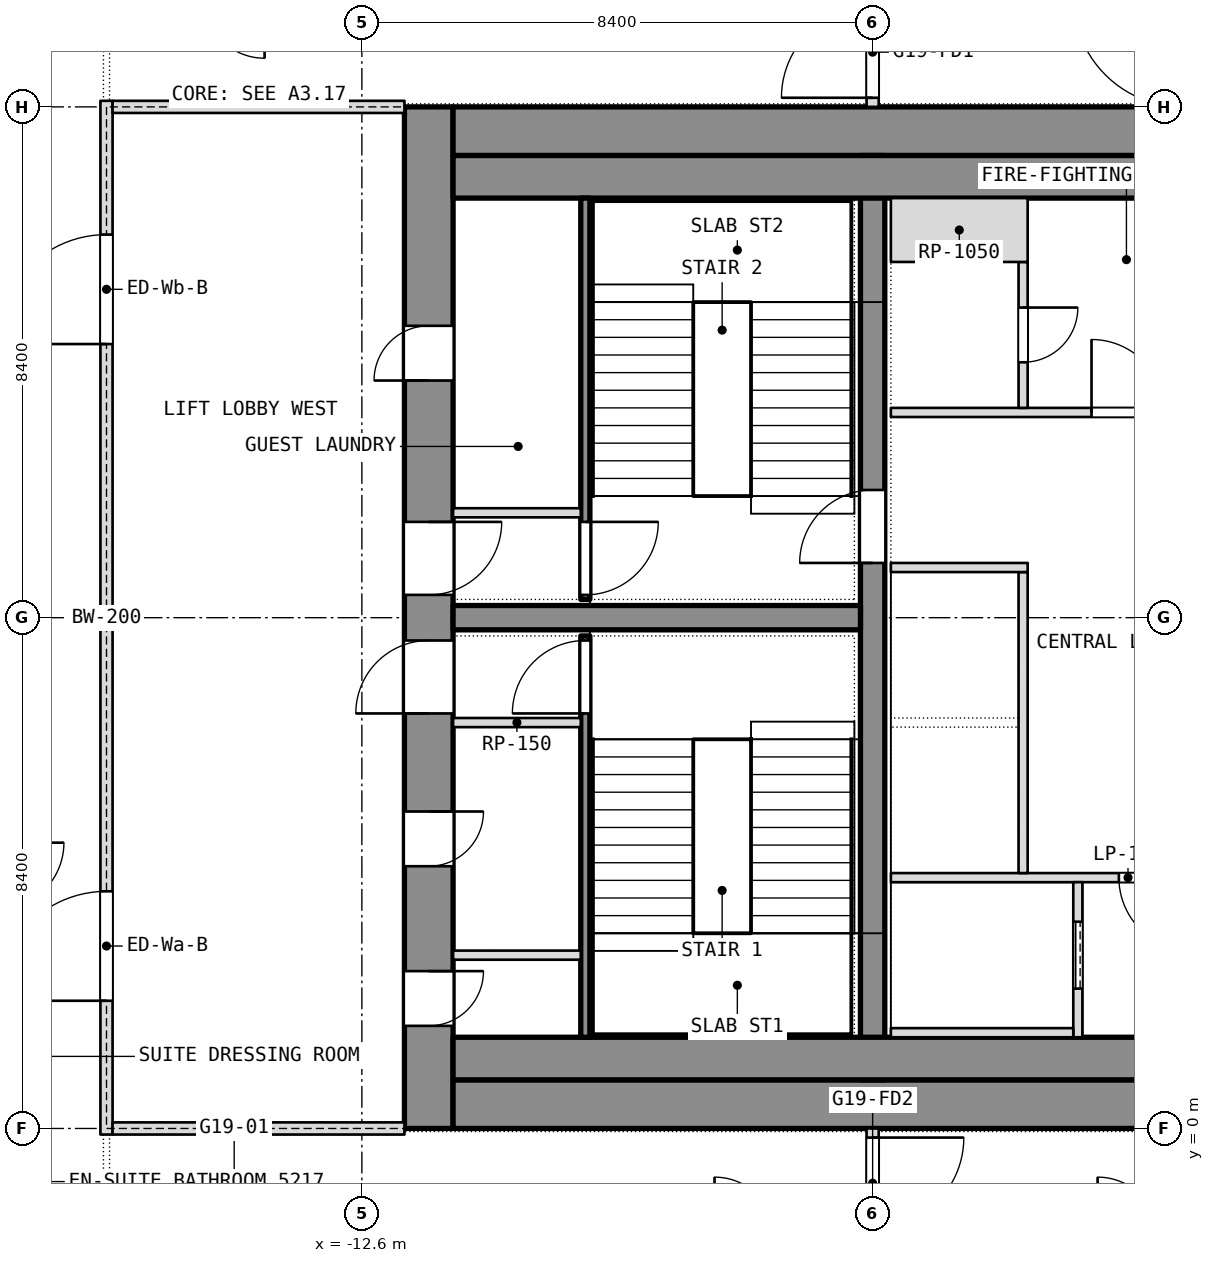
"""IFC4 building model, lengths in metres.
Left out: names, types, materials, properties, quantities, classifications, styles, units other than length and angle.
Written with IfcOpenShell. Run it as: python <this file> out.ifc"""

import sys

from ifc_helpers import new_model, si_unit, direction, frame, frame_2d, origin, place, context, subcontext, project, spatial, rectangle, extrude, element, fill, save


model = new_model("IFC4")
c1 = context("Model", 3, precision=1e-05, world=origin(), true_north=direction((0.0, 1.0)))
c2 = subcontext(c1, "Body", "Model", "MODEL_VIEW")
j1 = project(units=[si_unit("LENGTHUNIT", "METRE"), si_unit("PLANEANGLEUNIT", "RADIAN")], contexts=[c1])
p1 = place(None, origin())
s1 = spatial("IfcSite", under=j1, at=p1, CompositionType="ELEMENT")
p2 = place(p1, origin())
s2 = spatial("IfcBuilding", under=s1, at=p2, CompositionType="ELEMENT")
p3 = place(p2, frame((0.0, 0.0, 223.7)))
s3 = spatial("IfcBuildingStorey", under=s2, at=p3, CompositionType="ELEMENT", Elevation=223.7)
p4 = place(p3, frame((-11.5, 0.0, 0.0), z_axis=(0.0, 0.0, 1.0), x_axis=(0.0, 1.0, 0.0)))
e1 = element("IfcWall", 1, at=p4, inside=s3, PredefinedType="SHEAR", context=c2, shape_type="SweptSolid", body=[
    extrude(rectangle(XDim=16.8, YDim=0.8, at=frame_2d((8.4, 0.0))), origin(), (0.0, 0.0, 1.0), 3.6),
])
p5 = place(p4, frame((1.688, 0.0, 0.0)))
e2 = element("IfcOpeningElement", 2, at=p5, cuts=e1, PredefinedType="OPENING", context=c2, shape_type="SweptSolid", body=[
    extrude(rectangle(XDim=0.9, YDim=2.1, at=frame_2d((0.45, 1.05))), frame((0.0, 0.4, 0.0), z_axis=(0.0, -1.0, 0.0), x_axis=(1.0, 0.0, 0.0)), (0.0, 0.0, 1.0), 0.8),
])
p6 = place(p4, frame((4.312, 0.0, 0.0)))
e3 = element("IfcOpeningElement", 3, at=p6, cuts=e1, PredefinedType="OPENING", context=c2, shape_type="SweptSolid", body=[
    extrude(rectangle(XDim=0.9, YDim=2.1, at=frame_2d((0.45, 1.05))), frame((0.0, 0.4, 0.0), z_axis=(0.0, -1.0, 0.0), x_axis=(1.0, 0.0, 0.0)), (0.0, 0.0, 1.0), 0.8),
])
p7 = place(p4, frame((6.825, 0.0, 0.0)))
e4 = element("IfcOpeningElement", 4, at=p7, cuts=e1, PredefinedType="OPENING", context=c2, shape_type="SweptSolid", body=[
    extrude(rectangle(XDim=1.2, YDim=2.1, at=frame_2d((0.6, 1.05))), frame((0.0, 0.4, 0.0), z_axis=(0.0, -1.0, 0.0), x_axis=(1.0, 0.0, 0.0)), (0.0, 0.0, 1.0), 0.8),
])
p8 = place(p4, frame((12.3, 0.0, 0.0)))
e5 = element("IfcOpeningElement", 5, at=p8, cuts=e1, PredefinedType="OPENING", context=c2, shape_type="SweptSolid", body=[
    extrude(rectangle(XDim=0.9, YDim=2.1, at=frame_2d((0.45, 1.05))), frame((0.0, 0.4, 0.0), z_axis=(0.0, -1.0, 0.0), x_axis=(1.0, 0.0, 0.0)), (0.0, 0.0, 1.0), 0.8),
])
p9 = place(p4, frame((8.775, 0.0, 0.0)))
e6 = element("IfcOpeningElement", 6, at=p9, cuts=e1, PredefinedType="OPENING", context=c2, shape_type="SweptSolid", body=[
    extrude(rectangle(XDim=1.2, YDim=2.1, at=frame_2d((0.6, 1.05))), frame((0.0, 0.4, 0.0), z_axis=(0.0, -1.0, 0.0), x_axis=(1.0, 0.0, 0.0)), (0.0, 0.0, 1.0), 0.8),
])
for number, where, z_axis, x_axis in (
    (7, (-11.1, 0.4, 0.0), (0.0, 0.0, 1.0), (1.0, 0.0, 0.0)),
    (8, (-11.1, 16.4, 0.0), (0.0, 0.0, 1.0), (1.0, 0.0, 0.0)),
):
    element("IfcWall", number, at=place(p3, frame(where, z_axis=z_axis, x_axis=x_axis)), inside=s3, PredefinedType="SHEAR", context=c2, shape_type="SweptSolid", body=[
        extrude(rectangle(XDim=22.2, YDim=0.8, at=frame_2d((11.1, 0.0))), origin(), (0.0, 0.0, 1.0), 3.6),
    ])
p10 = place(p3, frame((-4.2, 0.8, 0.0), z_axis=(0.0, 0.0, 1.0), x_axis=(0.0, 1.0, 0.0)))
e9 = element("IfcWall", 9, at=p10, inside=s3, PredefinedType="SHEAR", context=c2, shape_type="SweptSolid", body=[
    extrude(rectangle(XDim=15.2, YDim=0.4, at=frame_2d((7.6, 0.0))), origin(), (0.0, 0.0, 1.0), 3.6),
])
p11 = place(p10, frame((8.5, 0.0, 0.0)))
e10 = element("IfcOpeningElement", 10, at=p11, cuts=e9, PredefinedType="OPENING", context=c2, shape_type="SweptSolid", body=[
    extrude(rectangle(XDim=1.2, YDim=2.1, at=frame_2d((0.6, 1.05))), frame((0.0, 0.2, 0.0), z_axis=(0.0, -1.0, 0.0), x_axis=(1.0, 0.0, 0.0)), (0.0, 0.0, 1.0), 0.4),
])
p12 = place(p3, frame((-11.1, 8.4, 0.0), z_axis=(0.0, 0.0, 1.0), x_axis=(1.0, 0.0, 0.0)))
e11 = element("IfcWall", 11, at=p12, inside=s3, PredefinedType="SHEAR", context=c2, shape_type="SweptSolid", body=[
    extrude(rectangle(XDim=6.7, YDim=0.4, at=frame_2d((3.35, 0.0))), origin(), (0.0, 0.0, 1.0), 3.6),
])
p13 = place(p3, frame((-4.2, -13.6, 0.0), z_axis=(0.0, 0.0, 1.0), x_axis=(0.0, 1.0, 0.0)))
e12 = element("IfcWall", 12, at=p13, inside=s3, PredefinedType="PARTITIONING", context=c2, shape_type="SweptSolid", body=[
    extrude(rectangle(XDim=13.6, YDim=0.2, at=frame_2d((6.8, 0.0))), origin(), (0.0, 0.0, 1.0), 3.34),
])
p14 = place(p13, frame((11.95, 0.0, 0.0)))
e13 = element("IfcOpeningElement", 13, at=p14, cuts=e12, PredefinedType="OPENING", context=c2, shape_type="SweptSolid", body=[
    extrude(rectangle(XDim=1.5, YDim=2.1, at=frame_2d((0.75, 1.05))), frame((0.0, 0.1, 0.0), z_axis=(0.0, -1.0, 0.0), x_axis=(1.0, 0.0, 0.0)), (0.0, 0.0, 1.0), 0.2),
])
p15 = place(p13, frame((0.25, 0.0, 0.0)))
e14 = element("IfcOpeningElement", 14, at=p15, cuts=e12, PredefinedType="OPENING", context=c2, shape_type="SweptSolid", body=[
    extrude(rectangle(XDim=1.5, YDim=2.1, at=frame_2d((0.75, 1.05))), frame((0.0, 0.1, 0.0), z_axis=(0.0, -1.0, 0.0), x_axis=(1.0, 0.0, 0.0)), (0.0, 0.0, 1.0), 0.2),
])
p16 = place(p3, frame((-4.2, 16.8, 0.0), z_axis=(0.0, 0.0, 1.0), x_axis=(0.0, 1.0, 0.0)))
e15 = element("IfcWall", 15, at=p16, inside=s3, PredefinedType="PARTITIONING", context=c2, shape_type="SweptSolid", body=[
    extrude(rectangle(XDim=5.54, YDim=0.2, at=frame_2d((2.77, 0.0))), origin(), (0.0, 0.0, 1.0), 3.34),
])
p17 = place(p16, frame((0.15, 0.0, 0.0)))
e16 = element("IfcOpeningElement", 16, at=p17, cuts=e15, PredefinedType="OPENING", context=c2, shape_type="SweptSolid", body=[
    extrude(rectangle(XDim=1.5, YDim=2.1, at=frame_2d((0.75, 1.05))), frame((0.0, 0.1, 0.0), z_axis=(0.0, -1.0, 0.0), x_axis=(1.0, 0.0, 0.0)), (0.0, 0.0, 1.0), 0.2),
])
for number, where, z_axis, x_axis in (
    (17, (-11.1, 1.15, 0.0), (0.0, 0.0, 1.0), (1.0, 0.0, 0.0)),
    (18, (-11.1, 15.65, 0.0), (0.0, 0.0, 1.0), (1.0, 0.0, 0.0)),
):
    element("IfcWall", number, at=place(p3, frame(where, z_axis=z_axis, x_axis=x_axis)), inside=s3, PredefinedType="PARTITIONING", context=c2, shape_type="SweptSolid", body=[
        extrude(rectangle(XDim=22.2, YDim=0.7, at=frame_2d((11.1, 0.0))), origin(), (0.0, 0.0, 1.0), 3.34),
    ])
p18 = place(p3, frame((-8.925, 1.5, 0.0), z_axis=(0.0, 0.0, 1.0), x_axis=(0.0, 1.0, 0.0)))
e19 = element("IfcWall", 19, at=p18, inside=s3, PredefinedType="SHEAR", context=c2, shape_type="SweptSolid", body=[
    extrude(rectangle(XDim=6.6, YDim=0.15, at=frame_2d((3.3, 0.0))), origin(), (0.0, 0.0, 1.0), 3.34),
])
p19 = place(p18, frame((5.325, 0.0, 0.0)))
e20 = element("IfcOpeningElement", 20, at=p19, cuts=e19, PredefinedType="OPENING", context=c2, shape_type="SweptSolid", body=[
    extrude(rectangle(XDim=1.2, YDim=2.1, at=frame_2d((0.6, 1.05))), frame((0.0, 0.075, 0.0), z_axis=(0.0, -1.0, 0.0), x_axis=(1.0, 0.0, 0.0)), (0.0, 0.0, 1.0), 0.15),
])
for number, where, z_axis, x_axis in (
    (21, (-11.1, 6.675, 0.0), (0.0, 0.0, 1.0), (1.0, 0.0, 0.0)),
    (22, (-11.1, 2.85, 0.0), (0.0, 0.0, 1.0), (1.0, 0.0, 0.0)),
):
    element("IfcWall", number, at=place(p3, frame(where, z_axis=z_axis, x_axis=x_axis)), inside=s3, PredefinedType="PARTITIONING", context=c2, shape_type="SweptSolid", body=[
        extrude(rectangle(XDim=2.1, YDim=0.15, at=frame_2d((1.05, 0.0))), origin(), (0.0, 0.0, 1.0), 3.34),
    ])
p20 = place(p3, frame((-8.925, 8.7, 0.0), z_axis=(0.0, 0.0, 1.0), x_axis=(0.0, 1.0, 0.0)))
e23 = element("IfcWall", 23, at=p20, inside=s3, PredefinedType="SHEAR", context=c2, shape_type="SweptSolid", body=[
    extrude(rectangle(XDim=6.6, YDim=0.15, at=frame_2d((3.3, 0.0))), origin(), (0.0, 0.0, 1.0), 3.34),
])
p21 = place(p20, frame((0.075, 0.0, 0.0)))
e24 = element("IfcOpeningElement", 24, at=p21, cuts=e23, PredefinedType="OPENING", context=c2, shape_type="SweptSolid", body=[
    extrude(rectangle(XDim=1.2, YDim=2.1, at=frame_2d((0.6, 1.05))), frame((0.0, 0.075, 0.0), z_axis=(0.0, -1.0, 0.0), x_axis=(1.0, 0.0, 0.0)), (0.0, 0.0, 1.0), 0.15),
])
p22 = place(p3, frame((-11.1, 10.125, 0.0), z_axis=(0.0, 0.0, 1.0), x_axis=(1.0, 0.0, 0.0)))
e25 = element("IfcWall", 25, at=p22, inside=s3, PredefinedType="PARTITIONING", context=c2, shape_type="SweptSolid", body=[
    extrude(rectangle(XDim=2.1, YDim=0.15, at=frame_2d((1.05, 0.0))), origin(), (0.0, 0.0, 1.0), 3.34),
])
p23 = place(p3, frame((-3.9, 4.125, 0.0), z_axis=(0.0, 0.0, 1.0), x_axis=(1.0, 0.0, 0.0)))
e26 = element("IfcWall", 26, at=p23, inside=s3, PredefinedType="PARTITIONING", context=c2, shape_type="SweptSolid", body=[
    extrude(rectangle(XDim=7.8, YDim=0.15, at=frame_2d((3.9, 0.0))), origin(), (0.0, 0.0, 1.0), 3.34),
])
p24 = place(p23, frame((3.75, 0.0, 0.0)))
e27 = element("IfcOpeningElement", 27, at=p24, cuts=e26, PredefinedType="OPENING", context=c2, shape_type="SweptSolid", body=[
    extrude(rectangle(XDim=1.2, YDim=2.1, at=frame_2d((0.6, 1.05))), frame((0.0, 0.075, 0.0), z_axis=(0.0, -1.0, 0.0), x_axis=(1.0, 0.0, 0.0)), (0.0, 0.0, 1.0), 0.15),
])
p25 = place(p3, frame((-3.9, 11.775, 0.0), z_axis=(0.0, 0.0, 1.0), x_axis=(1.0, 0.0, 0.0)))
e28 = element("IfcWall", 28, at=p25, inside=s3, PredefinedType="PARTITIONING", context=c2, shape_type="SweptSolid", body=[
    extrude(rectangle(XDim=7.8, YDim=0.15, at=frame_2d((3.9, 0.0))), origin(), (0.0, 0.0, 1.0), 3.34),
])
p26 = place(p25, frame((3.3, 0.0, 0.0)))
e29 = element("IfcOpeningElement", 29, at=p26, cuts=e28, PredefinedType="OPENING", context=c2, shape_type="SweptSolid", body=[
    extrude(rectangle(XDim=1.2, YDim=2.1, at=frame_2d((0.6, 1.05))), frame((0.0, 0.075, 0.0), z_axis=(0.0, -1.0, 0.0), x_axis=(1.0, 0.0, 0.0)), (0.0, 0.0, 1.0), 0.15),
])
p27 = place(p3, frame((-0.825, 1.5, 0.0), z_axis=(0.0, 0.0, 1.0), x_axis=(0.0, 1.0, 0.0)))
e30 = element("IfcWall", 30, at=p27, inside=s3, PredefinedType="SHEAR", context=c2, shape_type="SweptSolid", body=[
    extrude(rectangle(XDim=2.55, YDim=0.15, at=frame_2d((1.275, 0.0))), origin(), (0.0, 0.0, 1.0), 3.6),
])
p28 = place(p27, frame((0.8, 0.0, 0.0)))
e31 = element("IfcOpeningElement", 31, at=p28, cuts=e30, PredefinedType="OPENING", context=c2, shape_type="SweptSolid", body=[
    extrude(rectangle(XDim=1.1, YDim=2.1, at=frame_2d((0.55, 1.05))), frame((0.0, 0.075, 0.0), z_axis=(0.0, -1.0, 0.0), x_axis=(1.0, 0.0, 0.0)), (0.0, 0.0, 1.0), 0.15),
])
p29 = place(p3, frame((-3.9, 1.575, 0.0), z_axis=(0.0, 0.0, 1.0), x_axis=(1.0, 0.0, 0.0)))
e32 = element("IfcWall", 32, at=p29, inside=s3, PredefinedType="SHEAR", context=c2, shape_type="SweptSolid", body=[
    extrude(rectangle(XDim=3.0, YDim=0.15, at=frame_2d((1.5, 0.0))), origin(), (0.0, 0.0, 1.0), 3.6),
])
p30 = place(p3, frame((-1.725, 4.2, 0.0), z_axis=(0.0, 0.0, 1.0), x_axis=(0.0, 1.0, 0.0)))
e33 = element("IfcWall", 33, at=p30, inside=s3, PredefinedType="SHEAR", context=c2, shape_type="SweptSolid", body=[
    extrude(rectangle(XDim=4.95, YDim=0.15, at=frame_2d((2.475, 0.0))), origin(), (0.0, 0.0, 1.0), 3.6),
])
p31 = place(p3, frame((-3.9, 9.225, 0.0), z_axis=(0.0, 0.0, 1.0), x_axis=(1.0, 0.0, 0.0)))
e34 = element("IfcWall", 34, at=p31, inside=s3, PredefinedType="SHEAR", context=c2, shape_type="SweptSolid", body=[
    extrude(rectangle(XDim=2.25, YDim=0.15, at=frame_2d((1.125, 0.0))), origin(), (0.0, 0.0, 1.0), 3.6),
])
p32 = place(p3, frame((-1.725, 11.85, 0.0), z_axis=(0.0, 0.0, 1.0), x_axis=(0.0, 1.0, 0.0)))
e35 = element("IfcWall", 35, at=p32, inside=s3, PredefinedType="PARTITIONING", context=c2, shape_type="SweptSolid", body=[
    extrude(rectangle(XDim=2.4, YDim=0.15, at=frame_2d((1.2, 0.0))), origin(), (0.0, 0.0, 1.0), 3.34),
])
p33 = place(p32, frame((0.75, 0.0, 0.0)))
e36 = element("IfcOpeningElement", 36, at=p33, cuts=e35, PredefinedType="OPENING", context=c2, shape_type="SweptSolid", body=[
    extrude(rectangle(XDim=0.9, YDim=2.1, at=frame_2d((0.45, 1.05))), frame((0.0, 0.075, 0.0), z_axis=(0.0, -1.0, 0.0), x_axis=(1.0, 0.0, 0.0)), (0.0, 0.0, 1.0), 0.15),
])
p34 = place(p3, frame((-3.9, 14.775, 0.0), z_axis=(0.0, 0.0, 1.0), x_axis=(1.0, 0.0, 0.0)))
e37 = element("IfcWall", 37, at=p34, inside=s3, PredefinedType="PARTITIONING", context=c2, shape_type="SweptSolid", body=[
    extrude(rectangle(XDim=2.25, YDim=1.05, at=frame_2d((1.125, 0.0))), origin(), (0.0, 0.0, 1.0), 3.34),
])
p35 = place(p3, frame((-16.8, -0.1, 0.0), z_axis=(0.0, 0.0, 1.0), x_axis=(0.0, 1.0, 0.0)))
e38 = element("IfcWall", 38, at=p35, inside=s3, PredefinedType="PARTITIONING", context=c2, shape_type="SweptSolid", body=[
    extrude(rectangle(XDim=17.0, YDim=0.2, at=frame_2d((8.5, 0.0))), origin(), (0.0, 0.0, 1.0), 3.34),
])
p36 = place(p35, frame((2.2, 0.0, 0.0)))
e39 = element("IfcOpeningElement", 39, at=p36, cuts=e38, PredefinedType="OPENING", context=c2, shape_type="SweptSolid", body=[
    extrude(rectangle(XDim=1.8, YDim=2.1, at=frame_2d((0.9, 1.05))), frame((0.0, 0.1, 0.0), z_axis=(0.0, -1.0, 0.0), x_axis=(1.0, 0.0, 0.0)), (0.0, 0.0, 1.0), 0.2),
])
p37 = place(p35, frame((13.0, 0.0, 0.0)))
e40 = element("IfcOpeningElement", 40, at=p37, cuts=e38, PredefinedType="OPENING", context=c2, shape_type="SweptSolid", body=[
    extrude(rectangle(XDim=1.8, YDim=2.1, at=frame_2d((0.9, 1.05))), frame((0.0, 0.1, 0.0), z_axis=(0.0, -1.0, 0.0), x_axis=(1.0, 0.0, 0.0)), (0.0, 0.0, 1.0), 0.2),
])
for number, where, z_axis, x_axis in (
    (41, (-16.7, 0.0, 0.0), (0.0, 0.0, 1.0), (1.0, 0.0, 0.0)),
    (42, (-16.7, 16.8, 0.0), (0.0, 0.0, 1.0), (1.0, 0.0, 0.0)),
):
    element("IfcWall", number, at=place(p3, frame(where, z_axis=z_axis, x_axis=x_axis)), inside=s3, PredefinedType="PARTITIONING", context=c2, shape_type="SweptSolid", body=[
        extrude(rectangle(XDim=4.8, YDim=0.2, at=frame_2d((2.4, 0.0))), origin(), (0.0, 0.0, 1.0), 2.94),
    ])
p38 = place(p5, origin())
e43 = element("IfcDoor", 43, at=p38, inside=s3, OperationType="SINGLE_SWING_LEFT", PredefinedType="DOOR", context=c2, shape_type="SweptSolid", body=[
    extrude(rectangle(XDim=0.9, YDim=2.1, at=frame_2d((0.45, 1.05))), frame((0.0, 0.025, 0.0), z_axis=(0.0, -1.0, 0.0), x_axis=(1.0, 0.0, 0.0)), (0.0, 0.0, 1.0), 0.05),
])
fill(e2, e43)
p39 = place(p6, origin())
e44 = element("IfcDoor", 44, at=p39, inside=s3, OperationType="SINGLE_SWING_LEFT", PredefinedType="DOOR", context=c2, shape_type="SweptSolid", body=[
    extrude(rectangle(XDim=0.9, YDim=2.1, at=frame_2d((0.45, 1.05))), frame((0.0, 0.025, 0.0), z_axis=(0.0, -1.0, 0.0), x_axis=(1.0, 0.0, 0.0)), (0.0, 0.0, 1.0), 0.05),
])
fill(e3, e44)
p40 = place(p7, origin())
e45 = element("IfcDoor", 45, at=p40, inside=s3, OperationType="SINGLE_SWING_LEFT", PredefinedType="DOOR", context=c2, shape_type="SweptSolid", body=[
    extrude(rectangle(XDim=1.2, YDim=2.1, at=frame_2d((0.6, 1.05))), frame((0.0, 0.025, 0.0), z_axis=(0.0, -1.0, 0.0), x_axis=(1.0, 0.0, 0.0)), (0.0, 0.0, 1.0), 0.05),
])
fill(e4, e45)
p41 = place(p19, origin())
e46 = element("IfcDoor", 46, at=p41, inside=s3, OperationType="SINGLE_SWING_LEFT", PredefinedType="DOOR", context=c2, shape_type="SweptSolid", body=[
    extrude(rectangle(XDim=1.2, YDim=2.1, at=frame_2d((0.6, 1.05))), frame((0.0, 0.025, 0.0), z_axis=(0.0, -1.0, 0.0), x_axis=(1.0, 0.0, 0.0)), (0.0, 0.0, 1.0), 0.05),
])
fill(e20, e46)
p42 = place(p8, origin())
e47 = element("IfcDoor", 47, at=p42, inside=s3, OperationType="SINGLE_SWING_LEFT", PredefinedType="DOOR", context=c2, shape_type="SweptSolid", body=[
    extrude(rectangle(XDim=0.9, YDim=2.1, at=frame_2d((0.45, 1.05))), frame((0.0, 0.025, 0.0), z_axis=(0.0, -1.0, 0.0), x_axis=(1.0, 0.0, 0.0)), (0.0, 0.0, 1.0), 0.05),
])
fill(e5, e47)
p43 = place(p9, origin())
e48 = element("IfcDoor", 48, at=p43, inside=s3, OperationType="SINGLE_SWING_LEFT", PredefinedType="DOOR", context=c2, shape_type="SweptSolid", body=[
    extrude(rectangle(XDim=1.2, YDim=2.1, at=frame_2d((0.6, 1.05))), frame((0.0, 0.025, 0.0), z_axis=(0.0, -1.0, 0.0), x_axis=(1.0, 0.0, 0.0)), (0.0, 0.0, 1.0), 0.05),
])
fill(e6, e48)
p44 = place(p21, origin())
e49 = element("IfcDoor", 49, at=p44, inside=s3, OperationType="SINGLE_SWING_LEFT", PredefinedType="DOOR", context=c2, shape_type="SweptSolid", body=[
    extrude(rectangle(XDim=1.2, YDim=2.1, at=frame_2d((0.6, 1.05))), frame((0.0, 0.025, 0.0), z_axis=(0.0, -1.0, 0.0), x_axis=(1.0, 0.0, 0.0)), (0.0, 0.0, 1.0), 0.05),
])
fill(e24, e49)
p45 = place(p28, origin())
e50 = element("IfcDoor", 50, at=p45, inside=s3, OperationType="SLIDING_TO_LEFT", PredefinedType="DOOR", context=c2, shape_type="SweptSolid", body=[
    extrude(rectangle(XDim=1.1, YDim=2.1, at=frame_2d((0.55, 1.05))), frame((0.0, 0.025, 0.0), z_axis=(0.0, -1.0, 0.0), x_axis=(1.0, 0.0, 0.0)), (0.0, 0.0, 1.0), 0.05),
])
fill(e31, e50)
p46 = place(p24, origin())
e51 = element("IfcDoor", 51, at=p46, inside=s3, OperationType="SINGLE_SWING_LEFT", PredefinedType="DOOR", context=c2, shape_type="SweptSolid", body=[
    extrude(rectangle(XDim=1.2, YDim=2.1, at=frame_2d((0.6, 1.05))), frame((0.0, 0.025, 0.0), z_axis=(0.0, -1.0, 0.0), x_axis=(1.0, 0.0, 0.0)), (0.0, 0.0, 1.0), 0.05),
])
fill(e27, e51)
p47 = place(p26, origin())
e52 = element("IfcDoor", 52, at=p47, inside=s3, OperationType="SINGLE_SWING_LEFT", PredefinedType="DOOR", context=c2, shape_type="SweptSolid", body=[
    extrude(rectangle(XDim=1.2, YDim=2.1, at=frame_2d((0.6, 1.05))), frame((0.0, 0.025, 0.0), z_axis=(0.0, -1.0, 0.0), x_axis=(1.0, 0.0, 0.0)), (0.0, 0.0, 1.0), 0.05),
])
fill(e29, e52)
p48 = place(p33, origin())
e53 = element("IfcDoor", 53, at=p48, inside=s3, OperationType="SINGLE_SWING_LEFT", PredefinedType="DOOR", context=c2, shape_type="SweptSolid", body=[
    extrude(rectangle(XDim=0.9, YDim=2.1, at=frame_2d((0.45, 1.05))), frame((0.0, 0.025, 0.0), z_axis=(0.0, -1.0, 0.0), x_axis=(1.0, 0.0, 0.0)), (0.0, 0.0, 1.0), 0.05),
])
fill(e36, e53)
p49 = place(p11, origin())
e54 = element("IfcDoor", 54, at=p49, inside=s3, OperationType="SINGLE_SWING_LEFT", PredefinedType="DOOR", context=c2, shape_type="SweptSolid", body=[
    extrude(rectangle(XDim=1.2, YDim=2.1, at=frame_2d((0.6, 1.05))), frame((0.0, 0.025, 0.0), z_axis=(0.0, -1.0, 0.0), x_axis=(1.0, 0.0, 0.0)), (0.0, 0.0, 1.0), 0.05),
])
fill(e10, e54)
p50 = place(p36, origin())
e55 = element("IfcDoor", 55, at=p50, inside=s3, OperationType="DOUBLE_DOOR_SINGLE_SWING", PredefinedType="DOOR", context=c2, shape_type="SweptSolid", body=[
    extrude(rectangle(XDim=1.8, YDim=2.1, at=frame_2d((0.9, 1.05))), frame((0.0, 0.025, 0.0), z_axis=(0.0, -1.0, 0.0), x_axis=(1.0, 0.0, 0.0)), (0.0, 0.0, 1.0), 0.05),
])
fill(e39, e55)
p51 = place(p37, origin())
e56 = element("IfcDoor", 56, at=p51, inside=s3, OperationType="DOUBLE_DOOR_SINGLE_SWING", PredefinedType="DOOR", context=c2, shape_type="SweptSolid", body=[
    extrude(rectangle(XDim=1.8, YDim=2.1, at=frame_2d((0.9, 1.05))), frame((0.0, 0.025, 0.0), z_axis=(0.0, -1.0, 0.0), x_axis=(1.0, 0.0, 0.0)), (0.0, 0.0, 1.0), 0.05),
])
fill(e40, e56)
p52 = place(p17, origin())
e57 = element("IfcDoor", 57, at=p52, inside=s3, OperationType="DOUBLE_DOOR_DOUBLE_SWING", PredefinedType="DOOR", context=c2, shape_type="SweptSolid", body=[
    extrude(rectangle(XDim=1.5, YDim=2.1, at=frame_2d((0.75, 1.05))), frame((0.0, 0.025, 0.0), z_axis=(0.0, -1.0, 0.0), x_axis=(1.0, 0.0, 0.0)), (0.0, 0.0, 1.0), 0.05),
])
fill(e16, e57)
p53 = place(p14, origin())
e58 = element("IfcDoor", 58, at=p53, inside=s3, OperationType="DOUBLE_DOOR_DOUBLE_SWING", PredefinedType="DOOR", context=c2, shape_type="SweptSolid", body=[
    extrude(rectangle(XDim=1.5, YDim=2.1, at=frame_2d((0.75, 1.05))), frame((0.0, 0.025, 0.0), z_axis=(0.0, -1.0, 0.0), x_axis=(1.0, 0.0, 0.0)), (0.0, 0.0, 1.0), 0.05),
])
fill(e13, e58)
save(model, sys.argv[1])
